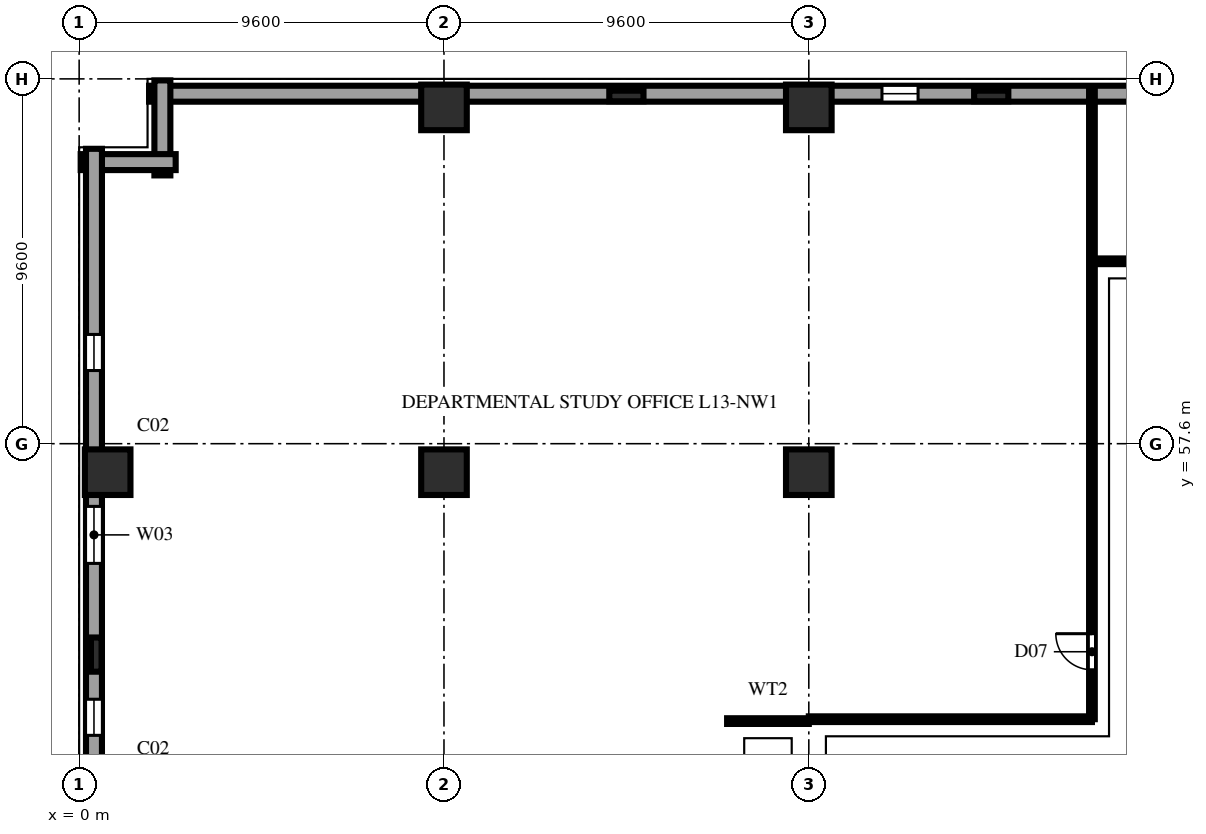
"""IFC4 building model, lengths in metres.
Left out: names, types, materials, properties, quantities, classifications, styles, units other than length and angle.
Written with IfcOpenShell. Run it as: python <this file> out.ifc"""

import sys

from ifc_helpers import new_model, si_unit, direction, frame, frame_2d, origin, origin_2d, place, context, subcontext, project, spatial, rectangle, extrude, element, fill, save


model = new_model("IFC4")
c1 = context("Model", 3, precision=1e-05, world=origin(), true_north=direction((0.0, 1.0)))
c2 = subcontext(c1, "Body", "Model", "MODEL_VIEW")
j1 = project(units=[si_unit("LENGTHUNIT", "METRE"), si_unit("PLANEANGLEUNIT", "RADIAN")], contexts=[c1])
p1 = place(None, origin())
s1 = spatial("IfcSite", under=j1, at=p1, CompositionType="ELEMENT")
p2 = place(p1, origin())
s2 = spatial("IfcBuilding", under=s1, at=p2, CompositionType="ELEMENT")
p3 = place(p2, frame((0.0, 0.0, 54.6)))
s3 = spatial("IfcBuildingStorey", under=s2, at=p3, CompositionType="ELEMENT", Elevation=54.6)
for number, where, z_axis, x_axis in (
    (1, (0.75, 56.85, 0.0), (0.0, 0.0, 1.0), (1.0, 0.0, 0.0)),
    (2, (9.6, 56.85, 0.0), (0.0, 0.0, 1.0), (1.0, 0.0, 0.0)),
    (3, (9.6, 66.45, 0.0), (0.0, 0.0, 1.0), (1.0, 0.0, 0.0)),
    (4, (19.2, 56.85, 0.0), (0.0, 0.0, 1.0), (1.0, 0.0, 0.0)),
    (5, (19.2, 66.45, 0.0), (0.0, 0.0, 1.0), (1.0, 0.0, 0.0)),
):
    element("IfcColumn", number, at=place(p3, frame(where, z_axis=z_axis, x_axis=x_axis)), inside=s3, PredefinedType="COLUMN", context=c2, shape_type="SweptSolid", body=[
        extrude(rectangle(XDim=1.2, YDim=1.2, at=origin_2d()), origin(), (0.0, 0.0, 1.0), 3.8),
    ])
for number, where, z_axis, x_axis in (
    (6, (0.45, 52.05, 0.0), (0.0, 0.0, 1.0), (0.0, 1.0, 0.0)),
    (7, (14.4, 66.75, 0.0), (0.0, 0.0, 1.0), (1.0, 0.0, 0.0)),
    (8, (24.0, 66.75, 0.0), (0.0, 0.0, 1.0), (1.0, 0.0, 0.0)),
):
    element("IfcColumn", number, at=place(p3, frame(where, z_axis=z_axis, x_axis=x_axis)), inside=s3, PredefinedType="PILASTER", context=c2, shape_type="SweptSolid", body=[
        extrude(rectangle(XDim=0.9, YDim=0.28, at=origin_2d()), origin(), (0.0, 0.0, 1.0), 3.8),
    ])
p4 = place(p3, frame((36.56, 66.81, 0.0), z_axis=(0.0, 0.0, 1.0), x_axis=(-1.0, 0.0, 0.0)))
e9 = element("IfcWall", 9, at=p4, inside=s3, PredefinedType="SOLIDWALL", context=c2, shape_type="SweptSolid", body=[
    extrude(rectangle(XDim=34.72, YDim=0.42, at=frame_2d((17.36, 0.0))), origin(), (0.0, 0.0, 1.0), 3.54),
])
p5 = place(p4, frame((4.885, 0.0, 0.9)))
e10 = element("IfcOpeningElement", 10, at=p5, cuts=e9, PredefinedType="OPENING", context=c2, shape_type="SweptSolid", body=[
    extrude(rectangle(XDim=0.95, YDim=1.85, at=frame_2d((0.475, 0.925))), frame((0.0, 0.222, 0.0), z_axis=(0.0, -1.0, 0.0), x_axis=(1.0, 0.0, 0.0)), (0.0, 0.0, 1.0), 0.444),
])
p6 = place(p4, frame((14.485, 0.0, 0.9)))
e11 = element("IfcOpeningElement", 11, at=p6, cuts=e9, PredefinedType="OPENING", context=c2, shape_type="SweptSolid", body=[
    extrude(rectangle(XDim=0.95, YDim=1.85, at=frame_2d((0.475, 0.925))), frame((0.0, 0.222, 0.0), z_axis=(0.0, -1.0, 0.0), x_axis=(1.0, 0.0, 0.0)), (0.0, 0.0, 1.0), 0.444),
])
for number, where, z_axis, x_axis in (
    (12, (2.19, 67.16, 0.0), (0.0, 0.0, 1.0), (0.0, -1.0, 0.0)),
    (13, (2.54, 65.01, 0.0), (0.0, 0.0, 1.0), (-1.0, 0.0, 0.0)),
):
    element("IfcWall", number, at=place(p3, frame(where, z_axis=z_axis, x_axis=x_axis)), inside=s3, PredefinedType="SOLIDWALL", context=c2, shape_type="SweptSolid", body=[
        extrude(rectangle(XDim=2.5, YDim=0.42, at=frame_2d((1.25, 0.0))), origin(), (0.0, 0.0, 1.0), 3.54),
    ])
p7 = place(p3, frame((0.39, 65.36, 0.0), z_axis=(0.0, 0.0, 1.0), x_axis=(0.0, -1.0, 0.0)))
e14 = element("IfcWall", 14, at=p7, inside=s3, PredefinedType="SOLIDWALL", context=c2, shape_type="SweptSolid", body=[
    extrude(rectangle(XDim=63.52, YDim=0.42, at=frame_2d((31.76, 0.0))), origin(), (0.0, 0.0, 1.0), 3.54),
])
p8 = place(p7, frame((4.885, 0.0, 0.9)))
e15 = element("IfcOpeningElement", 15, at=p8, cuts=e14, PredefinedType="OPENING", context=c2, shape_type="SweptSolid", body=[
    extrude(rectangle(XDim=0.95, YDim=1.85, at=frame_2d((0.475, 0.925))), frame((0.0, 0.222, 0.0), z_axis=(0.0, -1.0, 0.0), x_axis=(1.0, 0.0, 0.0)), (0.0, 0.0, 1.0), 0.444),
])
p9 = place(p7, frame((9.41, 0.0, 0.9)))
e16 = element("IfcOpeningElement", 16, at=p9, cuts=e14, PredefinedType="OPENING", context=c2, shape_type="SweptSolid", body=[
    extrude(rectangle(XDim=1.5, YDim=1.85, at=frame_2d((0.75, 0.925))), frame((0.0, 0.222, 0.0), z_axis=(0.0, -1.0, 0.0), x_axis=(1.0, 0.0, 0.0)), (0.0, 0.0, 1.0), 0.444),
])
p10 = place(p7, frame((14.485, 0.0, 0.9)))
e17 = element("IfcOpeningElement", 17, at=p10, cuts=e14, PredefinedType="OPENING", context=c2, shape_type="SweptSolid", body=[
    extrude(rectangle(XDim=0.95, YDim=1.85, at=frame_2d((0.475, 0.925))), frame((0.0, 0.222, 0.0), z_axis=(0.0, -1.0, 0.0), x_axis=(1.0, 0.0, 0.0)), (0.0, 0.0, 1.0), 0.444),
])
p11 = place(p7, frame((19.01, 0.0, 0.9)))
e18 = element("IfcOpeningElement", 18, at=p11, cuts=e14, PredefinedType="OPENING", context=c2, shape_type="SweptSolid", body=[
    extrude(rectangle(XDim=1.5, YDim=1.85, at=frame_2d((0.75, 0.925))), frame((0.0, 0.222, 0.0), z_axis=(0.0, -1.0, 0.0), x_axis=(1.0, 0.0, 0.0)), (0.0, 0.0, 1.0), 0.444),
])
p12 = place(p7, frame((24.085, 0.0, 0.9)))
e19 = element("IfcOpeningElement", 19, at=p12, cuts=e14, PredefinedType="OPENING", context=c2, shape_type="SweptSolid", body=[
    extrude(rectangle(XDim=0.95, YDim=1.85, at=frame_2d((0.475, 0.925))), frame((0.0, 0.222, 0.0), z_axis=(0.0, -1.0, 0.0), x_axis=(1.0, 0.0, 0.0)), (0.0, 0.0, 1.0), 0.444),
])
p13 = place(p7, frame((28.61, 0.0, 0.9)))
e20 = element("IfcOpeningElement", 20, at=p13, cuts=e14, PredefinedType="OPENING", context=c2, shape_type="SweptSolid", body=[
    extrude(rectangle(XDim=1.5, YDim=1.85, at=frame_2d((0.75, 0.925))), frame((0.0, 0.222, 0.0), z_axis=(0.0, -1.0, 0.0), x_axis=(1.0, 0.0, 0.0)), (0.0, 0.0, 1.0), 0.444),
])
p14 = place(p7, frame((33.685, 0.0, 0.9)))
e21 = element("IfcOpeningElement", 21, at=p14, cuts=e14, PredefinedType="OPENING", context=c2, shape_type="SweptSolid", body=[
    extrude(rectangle(XDim=0.95, YDim=1.85, at=frame_2d((0.475, 0.925))), frame((0.0, 0.222, 0.0), z_axis=(0.0, -1.0, 0.0), x_axis=(1.0, 0.0, 0.0)), (0.0, 0.0, 1.0), 0.444),
])
p15 = place(p7, frame((38.21, 0.0, 0.9)))
e22 = element("IfcOpeningElement", 22, at=p15, cuts=e14, PredefinedType="OPENING", context=c2, shape_type="SweptSolid", body=[
    extrude(rectangle(XDim=1.5, YDim=1.85, at=frame_2d((0.75, 0.925))), frame((0.0, 0.222, 0.0), z_axis=(0.0, -1.0, 0.0), x_axis=(1.0, 0.0, 0.0)), (0.0, 0.0, 1.0), 0.444),
])
p16 = place(p7, frame((43.285, 0.0, 0.9)))
e23 = element("IfcOpeningElement", 23, at=p16, cuts=e14, PredefinedType="OPENING", context=c2, shape_type="SweptSolid", body=[
    extrude(rectangle(XDim=0.95, YDim=1.85, at=frame_2d((0.475, 0.925))), frame((0.0, 0.222, 0.0), z_axis=(0.0, -1.0, 0.0), x_axis=(1.0, 0.0, 0.0)), (0.0, 0.0, 1.0), 0.444),
])
p17 = place(p7, frame((47.81, 0.0, 0.9)))
e24 = element("IfcOpeningElement", 24, at=p17, cuts=e14, PredefinedType="OPENING", context=c2, shape_type="SweptSolid", body=[
    extrude(rectangle(XDim=1.5, YDim=1.85, at=frame_2d((0.75, 0.925))), frame((0.0, 0.222, 0.0), z_axis=(0.0, -1.0, 0.0), x_axis=(1.0, 0.0, 0.0)), (0.0, 0.0, 1.0), 0.444),
])
p18 = place(p7, frame((52.885, 0.0, 0.9)))
e25 = element("IfcOpeningElement", 25, at=p18, cuts=e14, PredefinedType="OPENING", context=c2, shape_type="SweptSolid", body=[
    extrude(rectangle(XDim=0.95, YDim=1.85, at=frame_2d((0.475, 0.925))), frame((0.0, 0.222, 0.0), z_axis=(0.0, -1.0, 0.0), x_axis=(1.0, 0.0, 0.0)), (0.0, 0.0, 1.0), 0.444),
])
p19 = place(p3, frame((17.05, 50.3, 0.0), z_axis=(0.0, 0.0, 1.0), x_axis=(1.0, 0.0, 0.0)))
e26 = element("IfcWall", 26, at=p19, inside=s3, PredefinedType="PARTITIONING", context=c2, shape_type="SweptSolid", body=[
    extrude(rectangle(XDim=2.15, YDim=0.15, at=frame_2d((1.075, 0.0))), origin(), (0.0, 0.0, 1.0), 3.54),
])
p20 = place(p3, frame((19.2, 50.35, 0.0), z_axis=(0.0, 0.0, 1.0), x_axis=(1.0, 0.0, 0.0)))
e27 = element("IfcWall", 27, at=p20, inside=s3, PredefinedType="PARTITIONING", context=c2, shape_type="SweptSolid", body=[
    extrude(rectangle(XDim=7.45, YDim=0.15, at=frame_2d((3.725, 0.0))), origin(), (0.0, 0.0, 1.0), 3.54),
])
p21 = place(p3, frame((26.65, 62.4, 0.0), z_axis=(0.0, 0.0, 1.0), x_axis=(1.0, 0.0, 0.0)))
e28 = element("IfcWall", 28, at=p21, inside=s3, PredefinedType="PARTITIONING", context=c2, shape_type="SweptSolid", body=[
    extrude(rectangle(XDim=2.15, YDim=0.15, at=frame_2d((1.075, 0.0))), origin(), (0.0, 0.0, 1.0), 3.54),
])
p22 = place(p3, frame((26.65, 50.35, 0.0), z_axis=(0.0, 0.0, 1.0), x_axis=(0.0, 1.0, 0.0)))
e29 = element("IfcWall", 29, at=p22, inside=s3, PredefinedType="PARTITIONING", context=c2, shape_type="SweptSolid", body=[
    extrude(rectangle(XDim=16.63, YDim=0.15, at=frame_2d((8.315, 0.0))), origin(), (0.0, 0.0, 1.0), 3.54),
])
p23 = place(p22, frame((1.3, 0.0, 0.0)))
e30 = element("IfcOpeningElement", 30, at=p23, cuts=e29, PredefinedType="OPENING", context=c2, shape_type="SweptSolid", body=[
    extrude(rectangle(XDim=0.95, YDim=2.15, at=frame_2d((0.475, 1.075))), frame((0.0, 0.087, 0.0), z_axis=(0.0, -1.0, 0.0), x_axis=(1.0, 0.0, 0.0)), (0.0, 0.0, 1.0), 0.174),
])
p24 = place(p6, origin())
e31 = element("IfcWindow", 31, at=p24, inside=s3, PartitioningType="SINGLE_PANEL", PredefinedType="WINDOW", context=c2, shape_type="SweptSolid", body=[
    extrude(rectangle(XDim=0.95, YDim=1.85, at=frame_2d((0.475, 0.925))), frame((0.0, 0.11, 0.0), z_axis=(0.0, -1.0, 0.0), x_axis=(1.0, 0.0, 0.0)), (0.0, 0.0, 1.0), 0.06),
])
fill(e11, e31)
p25 = place(p8, origin())
e32 = element("IfcWindow", 32, at=p25, inside=s3, PartitioningType="SINGLE_PANEL", PredefinedType="WINDOW", context=c2, shape_type="SweptSolid", body=[
    extrude(rectangle(XDim=0.95, YDim=1.85, at=frame_2d((0.475, 0.925))), frame((0.0, 0.11, 0.0), z_axis=(0.0, -1.0, 0.0), x_axis=(1.0, 0.0, 0.0)), (0.0, 0.0, 1.0), 0.06),
])
fill(e15, e32)
p26 = place(p9, origin())
e33 = element("IfcWindow", 33, at=p26, inside=s3, PartitioningType="DOUBLE_PANEL_VERTICAL", PredefinedType="WINDOW", context=c2, shape_type="SweptSolid", body=[
    extrude(rectangle(XDim=1.5, YDim=1.85, at=frame_2d((0.75, 0.925))), frame((0.0, 0.11, 0.0), z_axis=(0.0, -1.0, 0.0), x_axis=(1.0, 0.0, 0.0)), (0.0, 0.0, 1.0), 0.06),
])
fill(e16, e33)
p27 = place(p10, origin())
e34 = element("IfcWindow", 34, at=p27, inside=s3, PartitioningType="SINGLE_PANEL", PredefinedType="WINDOW", context=c2, shape_type="SweptSolid", body=[
    extrude(rectangle(XDim=0.95, YDim=1.85, at=frame_2d((0.475, 0.925))), frame((0.0, 0.11, 0.0), z_axis=(0.0, -1.0, 0.0), x_axis=(1.0, 0.0, 0.0)), (0.0, 0.0, 1.0), 0.06),
])
fill(e17, e34)
p28 = place(p23, origin())
e35 = element("IfcDoor", 35, at=p28, inside=s3, OperationType="SINGLE_SWING_RIGHT", PredefinedType="DOOR", context=c2, shape_type="SweptSolid", body=[
    extrude(rectangle(XDim=0.95, YDim=2.15, at=frame_2d((0.475, 1.075))), frame((0.0, 0.025, 0.0), z_axis=(0.0, -1.0, 0.0), x_axis=(1.0, 0.0, 0.0)), (0.0, 0.0, 1.0), 0.05),
])
fill(e30, e35)
save(model, sys.argv[1])
